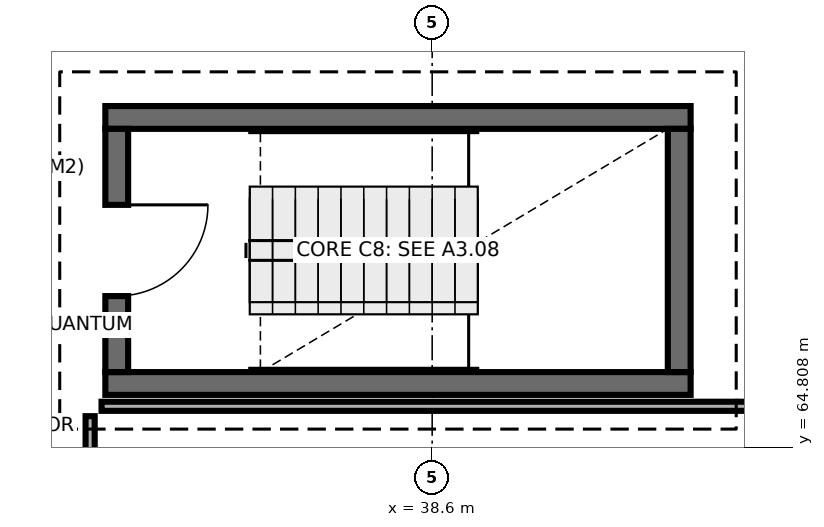
"""IFC4 building model, lengths in metres.
Left out: names, types, materials, properties, quantities, classifications, styles, units other than length and angle.
Written with IfcOpenShell. Run it as: python <this file> out.ifc"""

import sys

from ifc_helpers import new_model, si_unit, direction, frame, frame_2d, origin, place, context, subcontext, project, spatial, rectangle, extrude, element, fill, save


model = new_model("IFC4")
c1 = context("Model", 3, precision=1e-05, world=origin(), true_north=direction((0.0, 1.0)))
c2 = subcontext(c1, "Body", "Model", "MODEL_VIEW")
j1 = project(units=[si_unit("LENGTHUNIT", "METRE"), si_unit("PLANEANGLEUNIT", "RADIAN")], contexts=[c1])
p1 = place(None, origin())
s1 = spatial("IfcSite", under=j1, at=p1, CompositionType="ELEMENT")
p2 = place(p1, origin())
s2 = spatial("IfcBuilding", under=s1, at=p2, CompositionType="ELEMENT")
p3 = place(p2, frame((0.0, 0.0, 26.7)))
s3 = spatial("IfcBuildingStorey", under=s2, at=p3, CompositionType="ELEMENT", Elevation=26.7)
for number, where, z_axis, x_axis in (
    (1, (34.3, 65.65, 0.0), (0.0, 0.0, 1.0), (1.0, 0.0, 0.0)),
    (2, (42.0, 69.15, 0.0), (0.0, 0.0, 1.0), (-1.0, 0.0, 0.0)),
):
    element("IfcWall", number, at=place(p3, frame(where, z_axis=z_axis, x_axis=x_axis)), inside=s3, PredefinedType="SHEAR", context=c2, shape_type="SweptSolid", body=[
        extrude(rectangle(XDim=7.7, YDim=0.3, at=frame_2d((3.85, 0.0))), origin(), (0.0, 0.0, 1.0), 3.9),
    ])
p4 = place(p3, frame((34.45, 69.0, 0.0), z_axis=(0.0, 0.0, 1.0), x_axis=(0.0, -1.0, 0.0)))
e3 = element("IfcWall", 3, at=p4, inside=s3, PredefinedType="SHEAR", context=c2, shape_type="SweptSolid", body=[
    extrude(rectangle(XDim=3.2, YDim=0.3, at=frame_2d((1.6, 0.0))), origin(), (0.0, 0.0, 1.0), 3.9),
])
p5 = place(p4, frame((1.0, 0.0, 0.0)))
e4 = element("IfcOpeningElement", 4, at=p5, cuts=e3, PredefinedType="OPENING", context=c2, shape_type="SweptSolid", body=[
    extrude(rectangle(XDim=1.2, YDim=2.15, at=frame_2d((0.6, 1.075))), frame((0.0, 0.16, 0.0), z_axis=(0.0, -1.0, 0.0), x_axis=(1.0, 0.0, 0.0)), (0.0, 0.0, 1.0), 0.32),
])
p6 = place(p3, frame((41.85, 65.8, 0.0), z_axis=(0.0, 0.0, 1.0), x_axis=(0.0, 1.0, 0.0)))
e5 = element("IfcWall", 5, at=p6, inside=s3, PredefinedType="SHEAR", context=c2, shape_type="SweptSolid", body=[
    extrude(rectangle(XDim=3.2, YDim=0.3, at=frame_2d((1.6, 0.0))), origin(), (0.0, 0.0, 1.0), 3.9),
])
p7 = place(p3, frame((34.1, 61.5, 0.0), z_axis=(0.0, 0.0, 1.0), x_axis=(0.0, 1.0, 0.0)))
e6 = element("IfcWall", 6, at=p7, inside=s3, PredefinedType="PARTITIONING", context=c2, shape_type="SweptSolid", body=[
    extrude(rectangle(XDim=3.72, YDim=0.12, at=frame_2d((1.86, 0.0))), origin(), (0.0, 0.0, 1.0), 3.68),
])
p8 = place(p7, frame((1.41, 0.0, 0.0)))
e7 = element("IfcOpeningElement", 7, at=p8, cuts=e6, PredefinedType="OPENING", context=c2, shape_type="SweptSolid", body=[
    extrude(rectangle(XDim=0.9, YDim=2.1, at=frame_2d((0.45, 1.05))), frame((0.0, 0.07, 0.0), z_axis=(0.0, -1.0, 0.0), x_axis=(1.0, 0.0, 0.0)), (0.0, 0.0, 1.0), 0.14),
])
p9 = place(p3, frame((34.25, 65.35, 0.0), z_axis=(0.0, 0.0, 1.0), x_axis=(1.0, 0.0, 0.0)))
e8 = element("IfcWall", 8, at=p9, inside=s3, PredefinedType="PARTITIONING", context=c2, shape_type="SweptSolid", body=[
    extrude(rectangle(XDim=12.865, YDim=0.12, at=frame_2d((6.433, 0.0))), origin(), (0.0, 0.0, 1.0), 3.68),
])
p10 = place(p5, origin())
e9 = element("IfcDoor", 9, at=p10, inside=s3, OperationType="SINGLE_SWING_LEFT", PredefinedType="DOOR", context=c2, shape_type="SweptSolid", body=[
    extrude(rectangle(XDim=1.2, YDim=2.15, at=frame_2d((0.6, 1.075))), frame((0.0, 0.025, 0.0), z_axis=(0.0, -1.0, 0.0), x_axis=(1.0, 0.0, 0.0)), (0.0, 0.0, 1.0), 0.05),
])
fill(e4, e9)
save(model, sys.argv[1])
